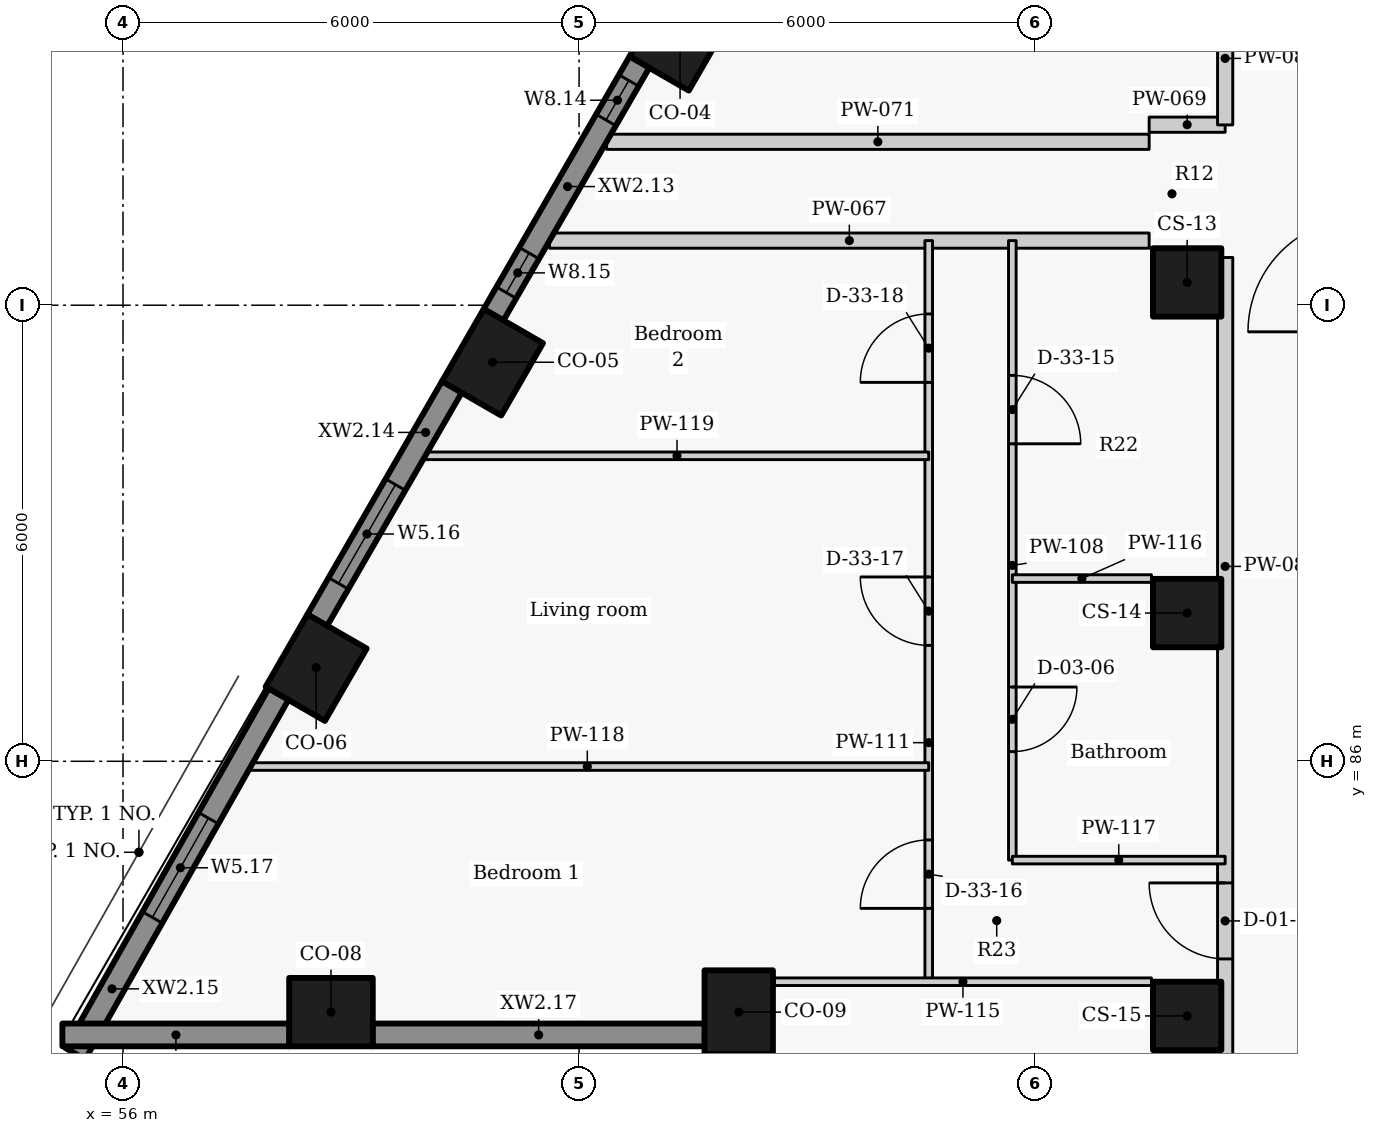
"""IFC4 building model, lengths in metres.
Left out: names, types, materials, properties, quantities, classifications, styles, units other than length and angle.
Written with IfcOpenShell. Run it as: python <this file> out.ifc"""

import sys

from ifc_helpers import new_model, si_unit, direction, frame, frame_2d, origin, origin_2d, place, context, subcontext, project, spatial, rectangle, extrude, element, fill, save


model = new_model("IFC4")
c1 = context("Model", 3, precision=1e-05, world=origin(), true_north=direction((0.0, 1.0)))
c2 = subcontext(c1, "Body", "Model", "MODEL_VIEW")
j1 = project(units=[si_unit("LENGTHUNIT", "METRE"), si_unit("PLANEANGLEUNIT", "RADIAN")], contexts=[c1])
p1 = place(None, origin())
s1 = spatial("IfcSite", under=j1, at=p1, CompositionType="ELEMENT")
p2 = place(p1, origin())
s2 = spatial("IfcBuilding", under=s1, at=p2, CompositionType="ELEMENT")
p3 = place(p2, frame((0.0, 0.0, 229.5)))
s3 = spatial("IfcBuildingStorey", under=s2, at=p3, CompositionType="ELEMENT", Elevation=229.5)
for number, where, z_axis, x_axis in (
    (1, (63.329, 95.525, 0.0), (0.0, 0.0, 1.0), (-0.5, -0.866, 0.0)),
    (2, (60.861, 91.25, 0.0), (0.0, 0.0, 1.0), (-0.5, -0.866, 0.0)),
    (3, (58.541, 87.232, 0.0), (0.0, 0.0, 1.0), (-0.5, -0.866, 0.0)),
    (4, (58.736, 82.7, 0.0), (0.0, 0.0, 1.0), (1.0, 0.0, 0.0)),
    (5, (64.101, 82.7, 0.0), (0.0, 0.0, 1.0), (0.0, -1.0, 0.0)),
):
    element("IfcColumn", number, at=place(p3, frame(where, z_axis=z_axis, x_axis=x_axis)), inside=s3, PredefinedType="COLUMN", context=c2, shape_type="SweptSolid", body=[
        extrude(rectangle(XDim=1.1, YDim=0.9, at=origin_2d()), origin(), (0.0, 0.0, 1.0), 3.3),
    ])
for number, where, z_axis, x_axis in (
    (6, (70.0, 92.3, 0.0), (0.0, 0.0, 1.0), (0.0, -1.0, 0.0)),
    (7, (70.0, 87.95, 0.0), (0.0, 0.0, 1.0), (0.0, -1.0, 0.0)),
    (8, (70.0, 82.65, 0.0), (0.0, 0.0, 1.0), (0.0, -1.0, 0.0)),
):
    element("IfcColumn", number, at=place(p3, frame(where, z_axis=z_axis, x_axis=x_axis)), inside=s3, PredefinedType="COLUMN", context=c2, shape_type="SweptSolid", body=[
        extrude(rectangle(XDim=0.9, YDim=0.9, at=origin_2d()), origin(), (0.0, 0.0, 1.0), 3.3),
    ])
p4 = place(p3, frame((62.796, 95.202, 0.0), z_axis=(0.0, 0.0, 1.0), x_axis=(-0.499984490703, -0.866034357896, 0.0)))
e9 = element("IfcWall", 9, at=p4, inside=s3, PredefinedType="SOLIDWALL", context=c2, shape_type="SweptSolid", body=[
    extrude(rectangle(XDim=3.844, YDim=0.3, at=frame_2d((1.922, 0.0))), origin(), (0.0, 0.0, 1.0), 2.425),
])
p5 = place(p4, frame((0.283, 0.0, 0.9)))
e10 = element("IfcOpeningElement", 10, at=p5, cuts=e9, PredefinedType="OPENING", context=c2, shape_type="SweptSolid", body=[
    extrude(rectangle(XDim=0.6, YDim=1.1, at=frame_2d((0.3, 0.55))), frame((0.0, 0.16, 0.0), z_axis=(0.0, -1.0, 0.0), x_axis=(1.0, 0.0, 0.0)), (0.0, 0.0, 1.0), 0.32),
])
p6 = place(p4, frame((2.906, 0.0, 0.9)))
e11 = element("IfcOpeningElement", 11, at=p6, cuts=e9, PredefinedType="OPENING", context=c2, shape_type="SweptSolid", body=[
    extrude(rectangle(XDim=0.6, YDim=1.1, at=frame_2d((0.3, 0.55))), frame((0.0, 0.16, 0.0), z_axis=(0.0, -1.0, 0.0), x_axis=(1.0, 0.0, 0.0)), (0.0, 0.0, 1.0), 0.32),
])
p7 = place(p3, frame((60.328, 90.927, 0.0), z_axis=(0.0, 0.0, 1.0), x_axis=(-0.500010404316, -0.866019396766, 0.0)))
e12 = element("IfcWall", 12, at=p7, inside=s3, PredefinedType="SOLIDWALL", context=c2, shape_type="SweptSolid", body=[
    extrude(rectangle(XDim=3.547, YDim=0.3, at=frame_2d((1.774, 0.0))), origin(), (0.0, 0.0, 1.0), 2.425),
])
p8 = place(p7, frame((1.486, 0.0, 0.9)))
e13 = element("IfcOpeningElement", 13, at=p8, cuts=e12, PredefinedType="OPENING", context=c2, shape_type="SweptSolid", body=[
    extrude(rectangle(XDim=1.5, YDim=1.1, at=frame_2d((0.75, 0.55))), frame((0.0, 0.16, 0.0), z_axis=(0.0, -1.0, 0.0), x_axis=(1.0, 0.0, 0.0)), (0.0, 0.0, 1.0), 0.32),
])
p9 = place(p3, frame((58.048, 86.886, 0.0), z_axis=(0.0, 0.0, 1.0), x_axis=(-0.492080931903, -0.870549456641, 0.0)))
e14 = element("IfcWall", 14, at=p9, inside=s3, PredefinedType="SOLIDWALL", context=c2, shape_type="SweptSolid", body=[
    extrude(rectangle(XDim=5.437, YDim=0.3, at=frame_2d((2.718, 0.0))), origin(), (0.0, 0.0, 1.0), 2.425),
])
p10 = place(p9, frame((1.878, 0.0, 0.9)))
e15 = element("IfcOpeningElement", 15, at=p10, cuts=e14, PredefinedType="OPENING", context=c2, shape_type="SweptSolid", body=[
    extrude(rectangle(XDim=1.5, YDim=1.1, at=frame_2d((0.75, 0.55))), frame((0.0, 0.16, 0.0), z_axis=(0.0, -1.0, 0.0), x_axis=(1.0, 0.0, 0.0)), (0.0, 0.0, 1.0), 0.32),
])
p11 = place(p3, frame((55.202, 82.4, 0.0), z_axis=(0.0, 0.0, 1.0), x_axis=(1.0, 0.0, 0.0)))
e16 = element("IfcWall", 16, at=p11, inside=s3, PredefinedType="SOLIDWALL", context=c2, shape_type="SweptSolid", body=[
    extrude(rectangle(XDim=2.988, YDim=0.3, at=frame_2d((1.494, 0.0))), origin(), (0.0, 0.0, 1.0), 2.425),
])
p12 = place(p3, frame((59.282, 82.4, 0.0), z_axis=(0.0, 0.0, 1.0), x_axis=(1.0, 0.0, 0.0)))
e17 = element("IfcWall", 17, at=p12, inside=s3, PredefinedType="SOLIDWALL", context=c2, shape_type="SweptSolid", body=[
    extrude(rectangle(XDim=4.373, YDim=0.3, at=frame_2d((2.186, 0.0))), origin(), (0.0, 0.0, 1.0), 2.425),
])
p13 = place(p3, frame((63.801, 82.154, 0.0), z_axis=(0.0, 0.0, 1.0), x_axis=(0.0, -1.0, 0.0)))
e18 = element("IfcWall", 18, at=p13, inside=s3, PredefinedType="SOLIDWALL", context=c2, shape_type="SweptSolid", body=[
    extrude(rectangle(XDim=4.408, YDim=0.3, at=frame_2d((2.204, 0.0))), origin(), (0.0, 0.0, 1.0), 2.425),
])
p14 = place(p13, frame((1.154, 0.0, 0.9)))
e19 = element("IfcOpeningElement", 19, at=p14, cuts=e18, PredefinedType="OPENING", context=c2, shape_type="SweptSolid", body=[
    extrude(rectangle(XDim=2.1, YDim=1.1, at=frame_2d((1.05, 0.55))), frame((0.0, 0.16, 0.0), z_axis=(0.0, -1.0, 0.0), x_axis=(1.0, 0.0, 0.0)), (0.0, 0.0, 1.0), 0.32),
])
p15 = place(p3, frame((61.611, 92.85, 0.0), z_axis=(0.0, 0.0, 1.0), x_axis=(1.0, 0.0, 0.0)))
e20 = element("IfcWall", 20, at=p15, inside=s3, PredefinedType="PARTITIONING", context=c2, shape_type="SweptSolid", body=[
    extrude(rectangle(XDim=7.889, YDim=0.2, at=frame_2d((3.944, 0.0))), origin(), (0.0, 0.0, 1.0), 2.405),
])
p16 = place(p3, frame((69.5, 94.375, 0.0), z_axis=(0.0, 0.0, 1.0), x_axis=(1.0, 0.0, 0.0)))
e21 = element("IfcWall", 21, at=p16, inside=s3, PredefinedType="PARTITIONING", context=c2, shape_type="SweptSolid", body=[
    extrude(rectangle(XDim=1.0, YDim=0.2, at=frame_2d((0.5, 0.0))), origin(), (0.0, 0.0, 1.0), 2.505),
])
p17 = place(p3, frame((62.362, 94.15, 0.0), z_axis=(0.0, 0.0, 1.0), x_axis=(1.0, 0.0, 0.0)))
e22 = element("IfcWall", 22, at=p17, inside=s3, PredefinedType="PARTITIONING", context=c2, shape_type="SweptSolid", body=[
    extrude(rectangle(XDim=7.138, YDim=0.2, at=frame_2d((3.569, 0.0))), origin(), (0.0, 0.0, 1.0), 2.405),
])
p18 = place(p3, frame((70.5, 72.577, 0.0), z_axis=(0.0, 0.0, 1.0), x_axis=(0.0, 1.0, 0.0)))
e23 = element("IfcWall", 23, at=p18, inside=s3, PredefinedType="PARTITIONING", context=c2, shape_type="SweptSolid", body=[
    extrude(rectangle(XDim=20.051, YDim=0.2, at=frame_2d((10.025, 0.0))), origin(), (0.0, 0.0, 1.0), 3.025),
])
p19 = place(p18, frame((3.023, 0.0, 0.0)))
e24 = element("IfcOpeningElement", 24, at=p19, cuts=e23, PredefinedType="OPENING", context=c2, shape_type="SweptSolid", body=[
    extrude(rectangle(XDim=1.0, YDim=2.1, at=frame_2d((0.5, 1.05))), frame((0.0, 0.11, 0.0), z_axis=(0.0, -1.0, 0.0), x_axis=(1.0, 0.0, 0.0)), (0.0, 0.0, 1.0), 0.22),
])
p20 = place(p18, frame((6.923, 0.0, 0.0)))
e25 = element("IfcOpeningElement", 25, at=p20, cuts=e23, PredefinedType="OPENING", context=c2, shape_type="SweptSolid", body=[
    extrude(rectangle(XDim=1.0, YDim=2.1, at=frame_2d((0.5, 1.05))), frame((0.0, 0.11, 0.0), z_axis=(0.0, -1.0, 0.0), x_axis=(1.0, 0.0, 0.0)), (0.0, 0.0, 1.0), 0.22),
])
p21 = place(p18, frame((10.823, 0.0, 0.0)))
e26 = element("IfcOpeningElement", 26, at=p21, cuts=e23, PredefinedType="OPENING", context=c2, shape_type="SweptSolid", body=[
    extrude(rectangle(XDim=1.0, YDim=2.1, at=frame_2d((0.5, 1.05))), frame((0.0, 0.11, 0.0), z_axis=(0.0, -1.0, 0.0), x_axis=(1.0, 0.0, 0.0)), (0.0, 0.0, 1.0), 0.22),
])
p22 = place(p3, frame((70.5, 94.372, 0.0), z_axis=(0.0, 0.0, 1.0), x_axis=(0.0, 1.0, 0.0)))
e27 = element("IfcWall", 27, at=p22, inside=s3, PredefinedType="PARTITIONING", context=c2, shape_type="SweptSolid", body=[
    extrude(rectangle(XDim=1.751, YDim=0.2, at=frame_2d((0.875, 0.0))), origin(), (0.0, 0.0, 1.0), 3.025),
])
p23 = place(p3, frame((67.7, 92.85, 0.0), z_axis=(0.0, 0.0, 1.0), x_axis=(0.0, -1.0, 0.0)))
e28 = element("IfcWall", 28, at=p23, inside=s3, PredefinedType="PARTITIONING", context=c2, shape_type="SweptSolid", body=[
    extrude(rectangle(XDim=8.15, YDim=0.1, at=frame_2d((4.075, 0.0))), origin(), (0.0, 0.0, 1.0), 3.025),
])
p24 = place(p23, frame((5.873, 0.0, 0.0)))
e29 = element("IfcOpeningElement", 29, at=p24, cuts=e28, PredefinedType="OPENING", context=c2, shape_type="SweptSolid", body=[
    extrude(rectangle(XDim=0.85, YDim=2.1, at=frame_2d((0.425, 1.05))), frame((0.0, 0.06, 0.0), z_axis=(0.0, -1.0, 0.0), x_axis=(1.0, 0.0, 0.0)), (0.0, 0.0, 1.0), 0.12),
])
p25 = place(p23, frame((1.773, 0.0, 0.0)))
e30 = element("IfcOpeningElement", 30, at=p25, cuts=e28, PredefinedType="OPENING", context=c2, shape_type="SweptSolid", body=[
    extrude(rectangle(XDim=0.9, YDim=2.1, at=frame_2d((0.45, 1.05))), frame((0.0, 0.06, 0.0), z_axis=(0.0, -1.0, 0.0), x_axis=(1.0, 0.0, 0.0)), (0.0, 0.0, 1.0), 0.12),
])
p26 = place(p3, frame((66.6, 83.1, 0.0), z_axis=(0.0, 0.0, 1.0), x_axis=(0.0, 1.0, 0.0)))
e31 = element("IfcWall", 31, at=p26, inside=s3, PredefinedType="PARTITIONING", context=c2, shape_type="SweptSolid", body=[
    extrude(rectangle(XDim=9.75, YDim=0.1, at=frame_2d((4.875, 0.0))), origin(), (0.0, 0.0, 1.0), 3.025),
])
p27 = place(p26, frame((0.965, 0.0, 0.0)))
e32 = element("IfcOpeningElement", 32, at=p27, cuts=e31, PredefinedType="OPENING", context=c2, shape_type="SweptSolid", body=[
    extrude(rectangle(XDim=0.9, YDim=2.1, at=frame_2d((0.45, 1.05))), frame((0.0, 0.06, 0.0), z_axis=(0.0, -1.0, 0.0), x_axis=(1.0, 0.0, 0.0)), (0.0, 0.0, 1.0), 0.12),
])
p28 = place(p26, frame((4.425, 0.0, 0.0)))
e33 = element("IfcOpeningElement", 33, at=p28, cuts=e31, PredefinedType="OPENING", context=c2, shape_type="SweptSolid", body=[
    extrude(rectangle(XDim=0.9, YDim=2.1, at=frame_2d((0.45, 1.05))), frame((0.0, 0.06, 0.0), z_axis=(0.0, -1.0, 0.0), x_axis=(1.0, 0.0, 0.0)), (0.0, 0.0, 1.0), 0.12),
])
p29 = place(p26, frame((7.885, 0.0, 0.0)))
e34 = element("IfcOpeningElement", 34, at=p29, cuts=e31, PredefinedType="OPENING", context=c2, shape_type="SweptSolid", body=[
    extrude(rectangle(XDim=0.9, YDim=2.1, at=frame_2d((0.45, 1.05))), frame((0.0, 0.06, 0.0), z_axis=(0.0, -1.0, 0.0), x_axis=(1.0, 0.0, 0.0)), (0.0, 0.0, 1.0), 0.12),
])
p30 = place(p3, frame((64.571, 83.1, 0.0), z_axis=(0.0, 0.0, 1.0), x_axis=(1.0, 0.0, 0.0)))
e35 = element("IfcWall", 35, at=p30, inside=s3, PredefinedType="PARTITIONING", context=c2, shape_type="SweptSolid", body=[
    extrude(rectangle(XDim=4.959, YDim=0.1, at=frame_2d((2.48, 0.0))), origin(), (0.0, 0.0, 1.0), 3.025),
])
p31 = place(p3, frame((67.7, 88.404, 0.0), z_axis=(0.0, 0.0, 1.0), x_axis=(1.0, 0.0, 0.0)))
e36 = element("IfcWall", 36, at=p31, inside=s3, PredefinedType="PARTITIONING", context=c2, shape_type="SweptSolid", body=[
    extrude(rectangle(XDim=1.83, YDim=0.1, at=frame_2d((0.915, 0.0))), origin(), (0.0, 0.0, 1.0), 3.025),
])
p32 = place(p3, frame((67.7, 84.7, 0.0), z_axis=(0.0, 0.0, 1.0), x_axis=(1.0, 0.0, 0.0)))
e37 = element("IfcWall", 37, at=p32, inside=s3, PredefinedType="PARTITIONING", context=c2, shape_type="SweptSolid", body=[
    extrude(rectangle(XDim=2.8, YDim=0.1, at=frame_2d((1.4, 0.0))), origin(), (0.0, 0.0, 1.0), 2.505),
])
p33 = place(p3, frame((57.616, 85.931, 0.0), z_axis=(0.0, 0.0, 1.0), x_axis=(1.0, 0.0, 0.0)))
e38 = element("IfcWall", 38, at=p33, inside=s3, PredefinedType="PARTITIONING", context=c2, shape_type="SweptSolid", body=[
    extrude(rectangle(XDim=8.984, YDim=0.1, at=frame_2d((4.492, 0.0))), origin(), (0.0, 0.0, 1.0), 2.405),
])
p34 = place(p3, frame((59.977, 90.019, 0.0), z_axis=(0.0, 0.0, 1.0), x_axis=(1.0, 0.0, 0.0)))
e39 = element("IfcWall", 39, at=p34, inside=s3, PredefinedType="PARTITIONING", context=c2, shape_type="SweptSolid", body=[
    extrude(rectangle(XDim=6.623, YDim=0.1, at=frame_2d((3.312, 0.0))), origin(), (0.0, 0.0, 1.0), 2.405),
])
p35 = place(p5, origin())
e40 = element("IfcWindow", 40, at=p35, inside=s3, PartitioningType="SINGLE_PANEL", PredefinedType="WINDOW", context=c2, shape_type="SweptSolid", body=[
    extrude(rectangle(XDim=0.6, YDim=1.1, at=frame_2d((0.3, 0.55))), frame((0.0, 0.03, 0.0), z_axis=(0.0, -1.0, 0.0), x_axis=(1.0, 0.0, 0.0)), (0.0, 0.0, 1.0), 0.06),
])
fill(e10, e40)
p36 = place(p6, origin())
e41 = element("IfcWindow", 41, at=p36, inside=s3, PartitioningType="SINGLE_PANEL", PredefinedType="WINDOW", context=c2, shape_type="SweptSolid", body=[
    extrude(rectangle(XDim=0.6, YDim=1.1, at=frame_2d((0.3, 0.55))), frame((0.0, 0.03, 0.0), z_axis=(0.0, -1.0, 0.0), x_axis=(1.0, 0.0, 0.0)), (0.0, 0.0, 1.0), 0.06),
])
fill(e11, e41)
p37 = place(p8, origin())
e42 = element("IfcWindow", 42, at=p37, inside=s3, PartitioningType="SINGLE_PANEL", PredefinedType="WINDOW", context=c2, shape_type="SweptSolid", body=[
    extrude(rectangle(XDim=1.5, YDim=1.1, at=frame_2d((0.75, 0.55))), frame((0.0, 0.03, 0.0), z_axis=(0.0, -1.0, 0.0), x_axis=(1.0, 0.0, 0.0)), (0.0, 0.0, 1.0), 0.06),
])
fill(e13, e42)
p38 = place(p10, origin())
e43 = element("IfcWindow", 43, at=p38, inside=s3, PartitioningType="SINGLE_PANEL", PredefinedType="WINDOW", context=c2, shape_type="SweptSolid", body=[
    extrude(rectangle(XDim=1.5, YDim=1.1, at=frame_2d((0.75, 0.55))), frame((0.0, 0.03, 0.0), z_axis=(0.0, -1.0, 0.0), x_axis=(1.0, 0.0, 0.0)), (0.0, 0.0, 1.0), 0.06),
])
fill(e15, e43)
p39 = place(p21, origin())
e44 = element("IfcDoor", 44, at=p39, inside=s3, OperationType="SINGLE_SWING_RIGHT", PredefinedType="DOOR", context=c2, shape_type="SweptSolid", body=[
    extrude(rectangle(XDim=1.0, YDim=2.1, at=frame_2d((0.5, 1.05))), frame((0.0, 0.025, 0.0), z_axis=(0.0, -1.0, 0.0), x_axis=(1.0, 0.0, 0.0)), (0.0, 0.0, 1.0), 0.05),
])
fill(e26, e44)
p40 = place(p24, origin())
e45 = element("IfcDoor", 45, at=p40, inside=s3, OperationType="SINGLE_SWING_LEFT", PredefinedType="DOOR", context=c2, shape_type="SweptSolid", body=[
    extrude(rectangle(XDim=0.85, YDim=2.1, at=frame_2d((0.425, 1.05))), frame((0.0, 0.025, 0.0), z_axis=(0.0, -1.0, 0.0), x_axis=(1.0, 0.0, 0.0)), (0.0, 0.0, 1.0), 0.05),
])
fill(e29, e45)
p41 = place(p25, origin())
e46 = element("IfcDoor", 46, at=p41, inside=s3, OperationType="SINGLE_SWING_RIGHT", PredefinedType="DOOR", context=c2, shape_type="SweptSolid", body=[
    extrude(rectangle(XDim=0.9, YDim=2.1, at=frame_2d((0.45, 1.05))), frame((0.0, 0.025, 0.0), z_axis=(0.0, -1.0, 0.0), x_axis=(1.0, 0.0, 0.0)), (0.0, 0.0, 1.0), 0.05),
])
fill(e30, e46)
p42 = place(p27, origin())
e47 = element("IfcDoor", 47, at=p42, inside=s3, OperationType="SINGLE_SWING_LEFT", PredefinedType="DOOR", context=c2, shape_type="SweptSolid", body=[
    extrude(rectangle(XDim=0.9, YDim=2.1, at=frame_2d((0.45, 1.05))), frame((0.0, 0.025, 0.0), z_axis=(0.0, -1.0, 0.0), x_axis=(1.0, 0.0, 0.0)), (0.0, 0.0, 1.0), 0.05),
])
fill(e32, e47)
p43 = place(p28, origin())
e48 = element("IfcDoor", 48, at=p43, inside=s3, OperationType="SINGLE_SWING_RIGHT", PredefinedType="DOOR", context=c2, shape_type="SweptSolid", body=[
    extrude(rectangle(XDim=0.9, YDim=2.1, at=frame_2d((0.45, 1.05))), frame((0.0, 0.025, 0.0), z_axis=(0.0, -1.0, 0.0), x_axis=(1.0, 0.0, 0.0)), (0.0, 0.0, 1.0), 0.05),
])
fill(e33, e48)
p44 = place(p29, origin())
e49 = element("IfcDoor", 49, at=p44, inside=s3, OperationType="SINGLE_SWING_LEFT", PredefinedType="DOOR", context=c2, shape_type="SweptSolid", body=[
    extrude(rectangle(XDim=0.9, YDim=2.1, at=frame_2d((0.45, 1.05))), frame((0.0, 0.025, 0.0), z_axis=(0.0, -1.0, 0.0), x_axis=(1.0, 0.0, 0.0)), (0.0, 0.0, 1.0), 0.05),
])
fill(e34, e49)
save(model, sys.argv[1])
